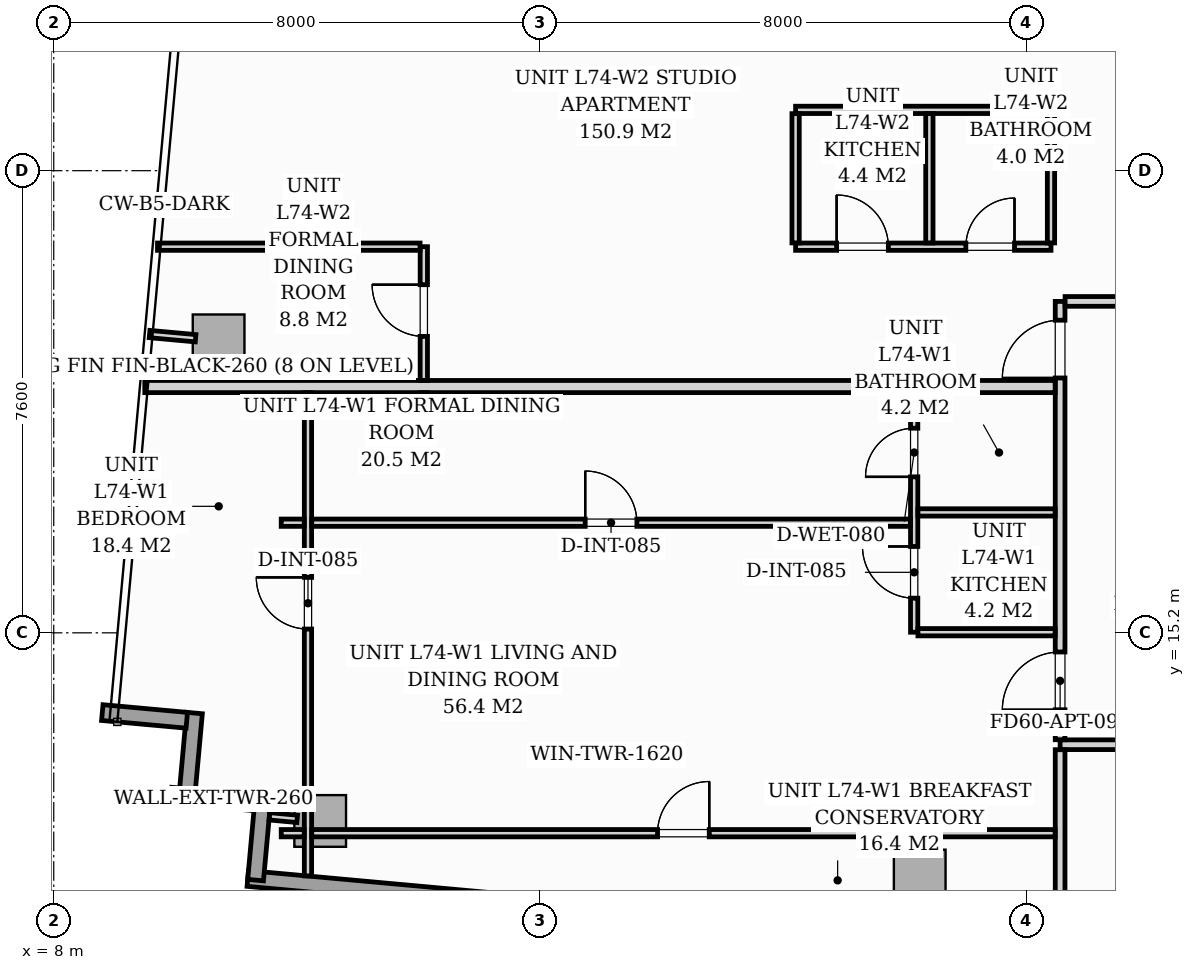
"""IFC4 building model, lengths in metres.
Left out: names, types, materials, properties, quantities, classifications, styles, units other than length and angle.
Written with IfcOpenShell. Run it as: python <this file> out.ifc"""

import sys

from ifc_helpers import new_model, si_unit, direction, frame, frame_2d, origin, origin_2d, place, context, subcontext, project, spatial, rectangle, extrude, source, transform, mapped, element, fill, save


model = new_model("IFC4")
c1 = context("Model", 3, precision=1e-05, world=origin(), true_north=direction((0.0, 1.0)))
c2 = subcontext(c1, "Body", "Model", "MODEL_VIEW")
j1 = project(units=[si_unit("LENGTHUNIT", "METRE"), si_unit("PLANEANGLEUNIT", "RADIAN")], contexts=[c1])
p1 = place(None, origin())
s1 = spatial("IfcSite", under=j1, at=p1, CompositionType="ELEMENT")
p2 = place(p1, origin())
s2 = spatial("IfcBuilding", under=s1, at=p2, CompositionType="ELEMENT")
p3 = place(p2, frame((0.0, 0.0, 256.2)))
s3 = spatial("IfcBuildingStorey", under=s2, at=p3, CompositionType="ELEMENT", Elevation=256.2)
m1 = source(origin(), c2, "Body", "SweptSolid", [
    extrude(rectangle(XDim=0.85, YDim=0.85, at=origin_2d()), origin(), (0.0, 0.0, 1.0), 3.294),
])
for number, where, z_axis, x_axis in (
    (1, (12.382, 12.106, 0.002), (0.0, 0.0, 1.0), (0.996, -0.091, 0.0)),
    (2, (22.241, 11.209, 0.002), (0.0, 0.0, 1.0), (0.996, -0.091, 0.0)),
    (3, (10.711, 20.01, 0.002), (0.0, 0.0, 1.0), (0.996, -0.091, 0.0)),
):
    element("IfcColumn", number, at=place(p3, frame(where, z_axis=z_axis, x_axis=x_axis)), inside=s3, PredefinedType="COLUMN", context=c2, shape_type="MappedRepresentation", body=[
        mapped(m1, transform((0.0, 0.0, 0.0), scale=1.0)),
    ])
p4 = place(p3, frame((11.319, 12.404, 0.0), z_axis=(0.0, 0.0, 1.0), x_axis=(-0.995881721538, 0.090661991521, 0.0)))
e4 = element("IfcWall", 4, at=p4, inside=s3, PredefinedType="STANDARD", context=c2, shape_type="SweptSolid", body=[
    extrude(rectangle(XDim=1.395, YDim=0.26, at=frame_2d((0.698, 0.0))), origin(), (0.0, 0.0, 1.0), 3.0),
])
p5 = place(p3, frame((10.188, 12.492, 0.0), z_axis=(0.0, 0.0, 1.0), x_axis=(0.090646191665, 0.995883159782, 0.0)))
e5 = element("IfcWall", 5, at=p5, inside=s3, PredefinedType="STANDARD", context=c2, shape_type="SweptSolid", body=[
    extrude(rectangle(XDim=1.395, YDim=0.26, at=frame_2d((0.698, 0.0))), origin(), (0.0, 0.0, 1.0), 3.0),
])
p6 = place(p3, frame((10.188, 13.762, 0.0), z_axis=(0.0, 0.0, 1.0), x_axis=(-0.995881721538, 0.090661991521, 0.0)))
e6 = element("IfcWall", 6, at=p6, inside=s3, PredefinedType="STANDARD", context=c2, shape_type="SweptSolid", body=[
    extrude(rectangle(XDim=1.395, YDim=0.26, at=frame_2d((0.698, 0.0))), origin(), (0.0, 0.0, 1.0), 3.0),
])
p7 = place(p3, frame((25.761, 9.834, 0.0), z_axis=(0.0, 0.0, 1.0), x_axis=(-0.995884584572, 0.090630536861, 0.0)))
e7 = element("IfcWall", 7, at=p7, inside=s3, PredefinedType="STANDARD", context=c2, shape_type="SweptSolid", body=[
    extrude(rectangle(XDim=14.63, YDim=0.26, at=frame_2d((7.315, 0.0))), origin(), (0.0, 0.0, 1.0), 3.0),
])
p8 = place(p7, frame((5.53, 0.0, 0.0)))
e8 = element("IfcOpeningElement", 8, at=p8, cuts=e7, PredefinedType="OPENING", context=c2, shape_type="SweptSolid", body=[
    extrude(rectangle(XDim=1.8, YDim=2.06, at=frame_2d((0.9, 1.03))), frame((0.0, 0.14, 0.0), z_axis=(0.0, -1.0, 0.0), x_axis=(1.0, 0.0, 0.0)), (0.0, 0.0, 1.0), 0.28),
])
p9 = place(p7, frame((7.9, 0.0, 0.65)))
e9 = element("IfcOpeningElement", 9, at=p9, cuts=e7, PredefinedType="OPENING", context=c2, shape_type="SweptSolid", body=[
    extrude(rectangle(XDim=1.6, YDim=1.5, at=frame_2d((0.8, 0.75))), frame((0.0, 0.14, 0.0), z_axis=(0.0, -1.0, 0.0), x_axis=(1.0, 0.0, 0.0)), (0.0, 0.0, 1.0), 0.28),
])
p10 = place(p3, frame((11.319, 11.134, 0.0), z_axis=(0.0, 0.0, 1.0), x_axis=(0.090661991521, 0.995881721538, 0.0)))
e10 = element("IfcWall", 10, at=p10, inside=s3, PredefinedType="STANDARD", context=c2, shape_type="SweptSolid", body=[
    extrude(rectangle(XDim=1.395, YDim=0.26, at=frame_2d((0.698, 0.0))), origin(), (0.0, 0.0, 1.0), 3.0),
])
p11 = place(p3, frame((24.55, 13.36, 0.0), z_axis=(0.0, 0.0, 1.0), x_axis=(1.0, 0.0, 0.0)))
e11 = element("IfcWall", 11, at=p11, inside=s3, PredefinedType="PARTITIONING", context=c2, shape_type="SweptSolid", body=[
    extrude(rectangle(XDim=21.33, YDim=0.16, at=frame_2d((10.665, 0.0))), origin(), (0.0, 0.0, 1.0), 2.51),
])
p12 = place(p11, frame((5.415, 0.0, 0.0)))
e12 = element("IfcOpeningElement", 12, at=p12, cuts=e11, PredefinedType="OPENING", context=c2, shape_type="SweptSolid", body=[
    extrude(rectangle(XDim=0.95, YDim=2.06, at=frame_2d((0.475, 1.03))), frame((0.0, 0.09, 0.0), z_axis=(0.0, -1.0, 0.0), x_axis=(1.0, 0.0, 0.0)), (0.0, 0.0, 1.0), 0.18),
])
p13 = place(p3, frame((24.55, 10.077, 0.0), z_axis=(0.0, 0.0, 1.0), x_axis=(0.0, 1.0, 0.0)))
e13 = element("IfcWall", 13, at=p13, inside=s3, PredefinedType="PARTITIONING", context=c2, shape_type="SweptSolid", body=[
    extrude(rectangle(XDim=3.201, YDim=0.16, at=frame_2d((1.601, 0.0))), origin(), (0.0, 0.0, 1.0), 3.0),
])
p14 = place(p3, frame((24.55, 13.442, 0.0), z_axis=(0.0, 0.0, 1.0), x_axis=(0.0, 1.0, 0.0)))
e14 = element("IfcWall", 14, at=p14, inside=s3, PredefinedType="PARTITIONING", context=c2, shape_type="SweptSolid", body=[
    extrude(rectangle(XDim=7.208, YDim=0.16, at=frame_2d((3.604, 0.0))), origin(), (0.0, 0.0, 1.0), 3.0),
])
p15 = place(p14, frame((0.493, 0.0, 0.0)))
e15 = element("IfcOpeningElement", 15, at=p15, cuts=e14, PredefinedType="OPENING", context=c2, shape_type="SweptSolid", body=[
    extrude(rectangle(XDim=0.95, YDim=2.06, at=frame_2d((0.475, 1.03))), frame((0.0, 0.09, 0.0), z_axis=(0.0, -1.0, 0.0), x_axis=(1.0, 0.0, 0.0)), (0.0, 0.0, 1.0), 0.18),
])
p16 = place(p14, frame((5.949, 0.0, 0.0)))
e16 = element("IfcOpeningElement", 16, at=p16, cuts=e14, PredefinedType="OPENING", context=c2, shape_type="SweptSolid", body=[
    extrude(rectangle(XDim=0.95, YDim=2.06, at=frame_2d((0.475, 1.03))), frame((0.0, 0.09, 0.0), z_axis=(0.0, -1.0, 0.0), x_axis=(1.0, 0.0, 0.0)), (0.0, 0.0, 1.0), 0.18),
])
p17 = place(p3, frame((24.632, 20.65, 0.0), z_axis=(0.0, 0.0, 1.0), x_axis=(1.0, 0.0, 0.0)))
e17 = element("IfcWall", 17, at=p17, inside=s3, PredefinedType="PARTITIONING", context=c2, shape_type="SweptSolid", body=[
    extrude(rectangle(XDim=1.566, YDim=0.16, at=frame_2d((0.783, 0.0))), origin(), (0.0, 0.0, 1.0), 3.0),
])
p18 = place(p3, frame((9.497, 19.25, 0.0), z_axis=(0.0, 0.0, 1.0), x_axis=(1.0, 0.0, 0.0)))
e18 = element("IfcWall", 18, at=p18, inside=s3, PredefinedType="PARTITIONING", context=c2, shape_type="SweptSolid", body=[
    extrude(rectangle(XDim=14.971, YDim=0.2, at=frame_2d((7.485, 0.0))), origin(), (0.0, 0.0, 1.0), 2.342),
])
p19 = place(p3, frame((22.15, 15.21, 0.0), z_axis=(0.0, 0.0, 1.0), x_axis=(0.0, 1.0, 0.0)))
e19 = element("IfcWall", 19, at=p19, inside=s3, PredefinedType="PARTITIONING", context=c2, shape_type="SweptSolid", body=[
    extrude(rectangle(XDim=3.938, YDim=0.12, at=frame_2d((1.969, 0.0))), origin(), (0.0, 0.0, 1.0), 3.0),
])
p20 = place(p19, frame((0.56, 0.0, 0.0)))
e20 = element("IfcOpeningElement", 20, at=p20, cuts=e19, PredefinedType="OPENING", context=c2, shape_type="SweptSolid", body=[
    extrude(rectangle(XDim=0.85, YDim=2.05, at=frame_2d((0.425, 1.025))), frame((0.0, 0.07, 0.0), z_axis=(0.0, -1.0, 0.0), x_axis=(1.0, 0.0, 0.0)), (0.0, 0.0, 1.0), 0.14),
])
p21 = place(p19, frame((2.555, 0.0, 0.0)))
e21 = element("IfcOpeningElement", 21, at=p21, cuts=e19, PredefinedType="OPENING", context=c2, shape_type="SweptSolid", body=[
    extrude(rectangle(XDim=0.8, YDim=2.02, at=frame_2d((0.4, 1.01))), frame((0.0, 0.07, 0.0), z_axis=(0.0, -1.0, 0.0), x_axis=(1.0, 0.0, 0.0)), (0.0, 0.0, 1.0), 0.14),
])
for number, where, z_axis, x_axis in (
    (22, (22.212, 17.18, 0.0), (0.0, 0.0, 1.0), (1.0, 0.0, 0.0)),
    (23, (22.212, 15.21, 0.0), (0.0, 0.0, 1.0), (1.0, 0.0, 0.0)),
):
    element("IfcWall", number, at=place(p3, frame(where, z_axis=z_axis, x_axis=x_axis)), inside=s3, PredefinedType="PARTITIONING", context=c2, shape_type="SweptSolid", body=[
        extrude(rectangle(XDim=2.256, YDim=0.12, at=frame_2d((1.128, 0.0))), origin(), (0.0, 0.0, 1.0), 3.0),
    ])
p22 = place(p3, frame((12.181, 11.203, 0.0), z_axis=(0.0, 0.0, 1.0), x_axis=(0.0, 1.0, 0.0)))
e24 = element("IfcWall", 24, at=p22, inside=s3, PredefinedType="PARTITIONING", context=c2, shape_type="SweptSolid", body=[
    extrude(rectangle(XDim=7.945, YDim=0.12, at=frame_2d((3.973, 0.0))), origin(), (0.0, 0.0, 1.0), 2.443),
])
p23 = place(p22, frame((4.059, 0.0, 0.0)))
e25 = element("IfcOpeningElement", 25, at=p23, cuts=e24, PredefinedType="OPENING", context=c2, shape_type="SweptSolid", body=[
    extrude(rectangle(XDim=0.85, YDim=2.05, at=frame_2d((0.425, 1.025))), frame((0.0, 0.07, 0.0), z_axis=(0.0, -1.0, 0.0), x_axis=(1.0, 0.0, 0.0)), (0.0, 0.0, 1.0), 0.14),
])
p24 = place(p3, frame((11.741, 17.011, 0.0), z_axis=(0.0, 0.0, 1.0), x_axis=(1.0, 0.0, 0.0)))
e26 = element("IfcWall", 26, at=p24, inside=s3, PredefinedType="PARTITIONING", context=c2, shape_type="SweptSolid", body=[
    extrude(rectangle(XDim=0.378, YDim=0.12, at=frame_2d((0.189, 0.0))), origin(), (0.0, 0.0, 1.0), 3.0),
])
p25 = place(p3, frame((12.243, 17.011, 0.0), z_axis=(0.0, 0.0, 1.0), x_axis=(1.0, 0.0, 0.0)))
e27 = element("IfcWall", 27, at=p25, inside=s3, PredefinedType="PARTITIONING", context=c2, shape_type="SweptSolid", body=[
    extrude(rectangle(XDim=9.845, YDim=0.12, at=frame_2d((4.922, 0.0))), origin(), (0.0, 0.0, 1.0), 3.0),
])
p26 = place(p25, frame((4.497, 0.0, 0.0)))
e28 = element("IfcOpeningElement", 28, at=p26, cuts=e27, PredefinedType="OPENING", context=c2, shape_type="SweptSolid", body=[
    extrude(rectangle(XDim=0.85, YDim=2.05, at=frame_2d((0.425, 1.025))), frame((0.0, 0.07, 0.0), z_axis=(0.0, -1.0, 0.0), x_axis=(1.0, 0.0, 0.0)), (0.0, 0.0, 1.0), 0.14),
])
p27 = place(p3, frame((11.741, 11.905, 0.0), z_axis=(0.0, 0.0, 1.0), x_axis=(1.0, 0.0, 0.0)))
e29 = element("IfcWall", 29, at=p27, inside=s3, PredefinedType="PARTITIONING", context=c2, shape_type="SweptSolid", body=[
    extrude(rectangle(XDim=0.378, YDim=0.12, at=frame_2d((0.189, 0.0))), origin(), (0.0, 0.0, 1.0), 3.0),
])
p28 = place(p3, frame((12.243, 11.905, 0.0), z_axis=(0.0, 0.0, 1.0), x_axis=(1.0, 0.0, 0.0)))
e30 = element("IfcWall", 30, at=p28, inside=s3, PredefinedType="PARTITIONING", context=c2, shape_type="SweptSolid", body=[
    extrude(rectangle(XDim=12.225, YDim=0.12, at=frame_2d((6.113, 0.0))), origin(), (0.0, 0.0, 1.0), 2.443),
])
p29 = place(p28, frame((5.687, 0.0, 0.0)))
e31 = element("IfcOpeningElement", 31, at=p29, cuts=e30, PredefinedType="OPENING", context=c2, shape_type="SweptSolid", body=[
    extrude(rectangle(XDim=0.85, YDim=2.05, at=frame_2d((0.425, 1.025))), frame((0.0, 0.07, 0.0), z_axis=(0.0, -1.0, 0.0), x_axis=(1.0, 0.0, 0.0)), (0.0, 0.0, 1.0), 0.14),
])
p30 = place(p3, frame((20.2, 21.55, 0.0), z_axis=(0.0, 0.0, 1.0), x_axis=(1.0, 0.0, 0.0)))
e32 = element("IfcWall", 32, at=p30, inside=s3, PredefinedType="PARTITIONING", context=c2, shape_type="SweptSolid", body=[
    extrude(rectangle(XDim=4.2, YDim=0.12, at=frame_2d((2.1, 0.0))), origin(), (0.0, 0.0, 1.0), 3.0),
])
p31 = place(p30, frame((0.675, 0.0, 0.0)))
e33 = element("IfcOpeningElement", 33, at=p31, cuts=e32, PredefinedType="OPENING", context=c2, shape_type="SweptSolid", body=[
    extrude(rectangle(XDim=0.85, YDim=2.05, at=frame_2d((0.425, 1.025))), frame((0.0, 0.07, 0.0), z_axis=(0.0, -1.0, 0.0), x_axis=(1.0, 0.0, 0.0)), (0.0, 0.0, 1.0), 0.14),
])
p32 = place(p30, frame((2.8, 0.0, 0.0)))
e34 = element("IfcOpeningElement", 34, at=p32, cuts=e32, PredefinedType="OPENING", context=c2, shape_type="SweptSolid", body=[
    extrude(rectangle(XDim=0.8, YDim=2.02, at=frame_2d((0.4, 1.01))), frame((0.0, 0.07, 0.0), z_axis=(0.0, -1.0, 0.0), x_axis=(1.0, 0.0, 0.0)), (0.0, 0.0, 1.0), 0.14),
])
p33 = place(p3, frame((20.2, 23.8, 0.0), z_axis=(0.0, 0.0, 1.0), x_axis=(1.0, 0.0, 0.0)))
e35 = element("IfcWall", 35, at=p33, inside=s3, PredefinedType="PARTITIONING", context=c2, shape_type="SweptSolid", body=[
    extrude(rectangle(XDim=4.2, YDim=0.12, at=frame_2d((2.1, 0.0))), origin(), (0.0, 0.0, 1.0), 3.0),
])
for number, where, z_axis, x_axis in (
    (36, (20.2, 21.612, 0.0), (0.0, 0.0, 1.0), (0.0, 1.0, 0.0)),
    (37, (22.4, 21.612, 0.0), (0.0, 0.0, 1.0), (0.0, 1.0, 0.0)),
    (38, (24.4, 21.612, 0.0), (0.0, 0.0, 1.0), (0.0, 1.0, 0.0)),
):
    element("IfcWall", number, at=place(p3, frame(where, z_axis=z_axis, x_axis=x_axis)), inside=s3, PredefinedType="PARTITIONING", context=c2, shape_type="SweptSolid", body=[
        extrude(rectangle(XDim=2.126, YDim=0.12, at=frame_2d((1.063, 0.0))), origin(), (0.0, 0.0, 1.0), 3.0),
    ])
p34 = place(p3, frame((14.086, 18.75, 0.0), z_axis=(0.0, 0.0, 1.0), x_axis=(0.0, 1.0, 0.0)))
e39 = element("IfcWall", 39, at=p34, inside=s3, PredefinedType="PARTITIONING", context=c2, shape_type="SweptSolid", body=[
    extrude(rectangle(XDim=0.398, YDim=0.12, at=frame_2d((0.199, 0.0))), origin(), (0.0, 0.0, 1.0), 3.0),
])
p35 = place(p3, frame((14.086, 19.352, 0.0), z_axis=(0.0, 0.0, 1.0), x_axis=(0.0, 1.0, 0.0)))
e40 = element("IfcWall", 40, at=p35, inside=s3, PredefinedType="PARTITIONING", context=c2, shape_type="SweptSolid", body=[
    extrude(rectangle(XDim=2.198, YDim=0.12, at=frame_2d((1.099, 0.0))), origin(), (0.0, 0.0, 1.0), 3.0),
])
p36 = place(p35, frame((0.723, 0.0, 0.0)))
e41 = element("IfcOpeningElement", 41, at=p36, cuts=e40, PredefinedType="OPENING", context=c2, shape_type="SweptSolid", body=[
    extrude(rectangle(XDim=0.85, YDim=2.05, at=frame_2d((0.425, 1.025))), frame((0.0, 0.07, 0.0), z_axis=(0.0, -1.0, 0.0), x_axis=(1.0, 0.0, 0.0)), (0.0, 0.0, 1.0), 0.14),
])
p37 = place(p3, frame((9.707, 21.55, 0.0), z_axis=(0.0, 0.0, 1.0), x_axis=(1.0, 0.0, 0.0)))
e42 = element("IfcWall", 42, at=p37, inside=s3, PredefinedType="PARTITIONING", context=c2, shape_type="SweptSolid", body=[
    extrude(rectangle(XDim=4.317, YDim=0.12, at=frame_2d((2.159, 0.0))), origin(), (0.0, 0.0, 1.0), 3.0),
])
p38 = place(p3, frame((12.003, 12.141, 0.0), z_axis=(0.0, 0.0, 1.0), x_axis=(-0.995884462012, 0.090631883588, 0.0)))
e43 = element("IfcWall", 43, at=p38, inside=s3, PredefinedType="PARTITIONING", context=c2, shape_type="SweptSolid", body=[
    extrude(rectangle(XDim=0.458, YDim=0.12, at=frame_2d((0.229, 0.0))), origin(), (0.0, 0.0, 1.0), 3.0),
])
p39 = place(p3, frame((10.333, 20.045, 0.0), z_axis=(0.0, 0.0, 1.0), x_axis=(-0.995890573658, 0.09056470228, 0.0)))
e44 = element("IfcWall", 44, at=p39, inside=s3, PredefinedType="PARTITIONING", context=c2, shape_type="SweptSolid", body=[
    extrude(rectangle(XDim=0.76, YDim=0.12, at=frame_2d((0.38, 0.0))), origin(), (0.0, 0.0, 1.0), 3.0),
])
m2 = source(origin(), c2, "Body", "SweptSolid", [
    extrude(rectangle(XDim=0.95, YDim=2.06, at=frame_2d((0.475, 1.03))), frame((0.0, 0.025, 0.0), z_axis=(0.0, -1.0, 0.0), x_axis=(1.0, 0.0, 0.0)), (0.0, 0.0, 1.0), 0.05),
])
p40 = place(p15, origin())
e45 = element("IfcDoor", 45, at=p40, inside=s3, OperationType="SINGLE_SWING_LEFT", PredefinedType="DOOR", context=c2, shape_type="MappedRepresentation", body=[
    mapped(m2, transform((0.0, 0.0, 0.0), scale=1.0)),
])
fill(e15, e45)
m3 = source(origin(), c2, "Body", "SweptSolid", [
    extrude(rectangle(XDim=0.85, YDim=2.05, at=frame_2d((0.425, 1.025))), frame((0.0, 0.025, 0.0), z_axis=(0.0, -1.0, 0.0), x_axis=(1.0, 0.0, 0.0)), (0.0, 0.0, 1.0), 0.05),
])
p41 = place(p20, origin())
e46 = element("IfcDoor", 46, at=p41, inside=s3, OperationType="SINGLE_SWING_RIGHT", PredefinedType="DOOR", context=c2, shape_type="MappedRepresentation", body=[
    mapped(m3, transform((0.0, 0.0, 0.0), scale=1.0)),
])
fill(e20, e46)
m4 = source(origin(), c2, "Body", "SweptSolid", [
    extrude(rectangle(XDim=0.8, YDim=2.02, at=frame_2d((0.4, 1.01))), frame((0.0, 0.025, 0.0), z_axis=(0.0, -1.0, 0.0), x_axis=(1.0, 0.0, 0.0)), (0.0, 0.0, 1.0), 0.05),
])
p42 = place(p21, origin())
e47 = element("IfcDoor", 47, at=p42, inside=s3, OperationType="SINGLE_SWING_LEFT", PredefinedType="DOOR", context=c2, shape_type="MappedRepresentation", body=[
    mapped(m4, transform((0.0, 0.0, 0.0), scale=1.0)),
])
fill(e21, e47)
p43 = place(p23, origin())
e48 = element("IfcDoor", 48, at=p43, inside=s3, OperationType="SINGLE_SWING_RIGHT", PredefinedType="DOOR", context=c2, shape_type="MappedRepresentation", body=[
    mapped(m3, transform((0.0, 0.0, 0.0), scale=1.0)),
])
fill(e25, e48)
p44 = place(p26, origin())
e49 = element("IfcDoor", 49, at=p44, inside=s3, OperationType="SINGLE_SWING_LEFT", PredefinedType="DOOR", context=c2, shape_type="MappedRepresentation", body=[
    mapped(m3, transform((0.0, 0.0, 0.0), scale=1.0)),
])
fill(e28, e49)
p45 = place(p29, origin())
e50 = element("IfcDoor", 50, at=p45, inside=s3, OperationType="SINGLE_SWING_RIGHT", PredefinedType="DOOR", context=c2, shape_type="MappedRepresentation", body=[
    mapped(m3, transform((0.0, 0.0, 0.0), scale=1.0)),
])
fill(e31, e50)
p46 = place(p16, origin())
e51 = element("IfcDoor", 51, at=p46, inside=s3, OperationType="SINGLE_SWING_LEFT", PredefinedType="DOOR", context=c2, shape_type="MappedRepresentation", body=[
    mapped(m2, transform((0.0, 0.0, 0.0), scale=1.0)),
])
fill(e16, e51)
p47 = place(p36, origin())
e52 = element("IfcDoor", 52, at=p47, inside=s3, OperationType="SINGLE_SWING_RIGHT", PredefinedType="DOOR", context=c2, shape_type="MappedRepresentation", body=[
    mapped(m3, transform((0.0, 0.0, 0.0), scale=1.0)),
])
fill(e41, e52)
p48 = place(p31, origin())
e53 = element("IfcDoor", 53, at=p48, inside=s3, OperationType="SINGLE_SWING_LEFT", PredefinedType="DOOR", context=c2, shape_type="MappedRepresentation", body=[
    mapped(m3, transform((0.0, 0.0, 0.0), scale=1.0)),
])
fill(e33, e53)
p49 = place(p32, origin())
e54 = element("IfcDoor", 54, at=p49, inside=s3, OperationType="SINGLE_SWING_RIGHT", PredefinedType="DOOR", context=c2, shape_type="MappedRepresentation", body=[
    mapped(m4, transform((0.0, 0.0, 0.0), scale=1.0)),
])
fill(e34, e54)
save(model, sys.argv[1])
